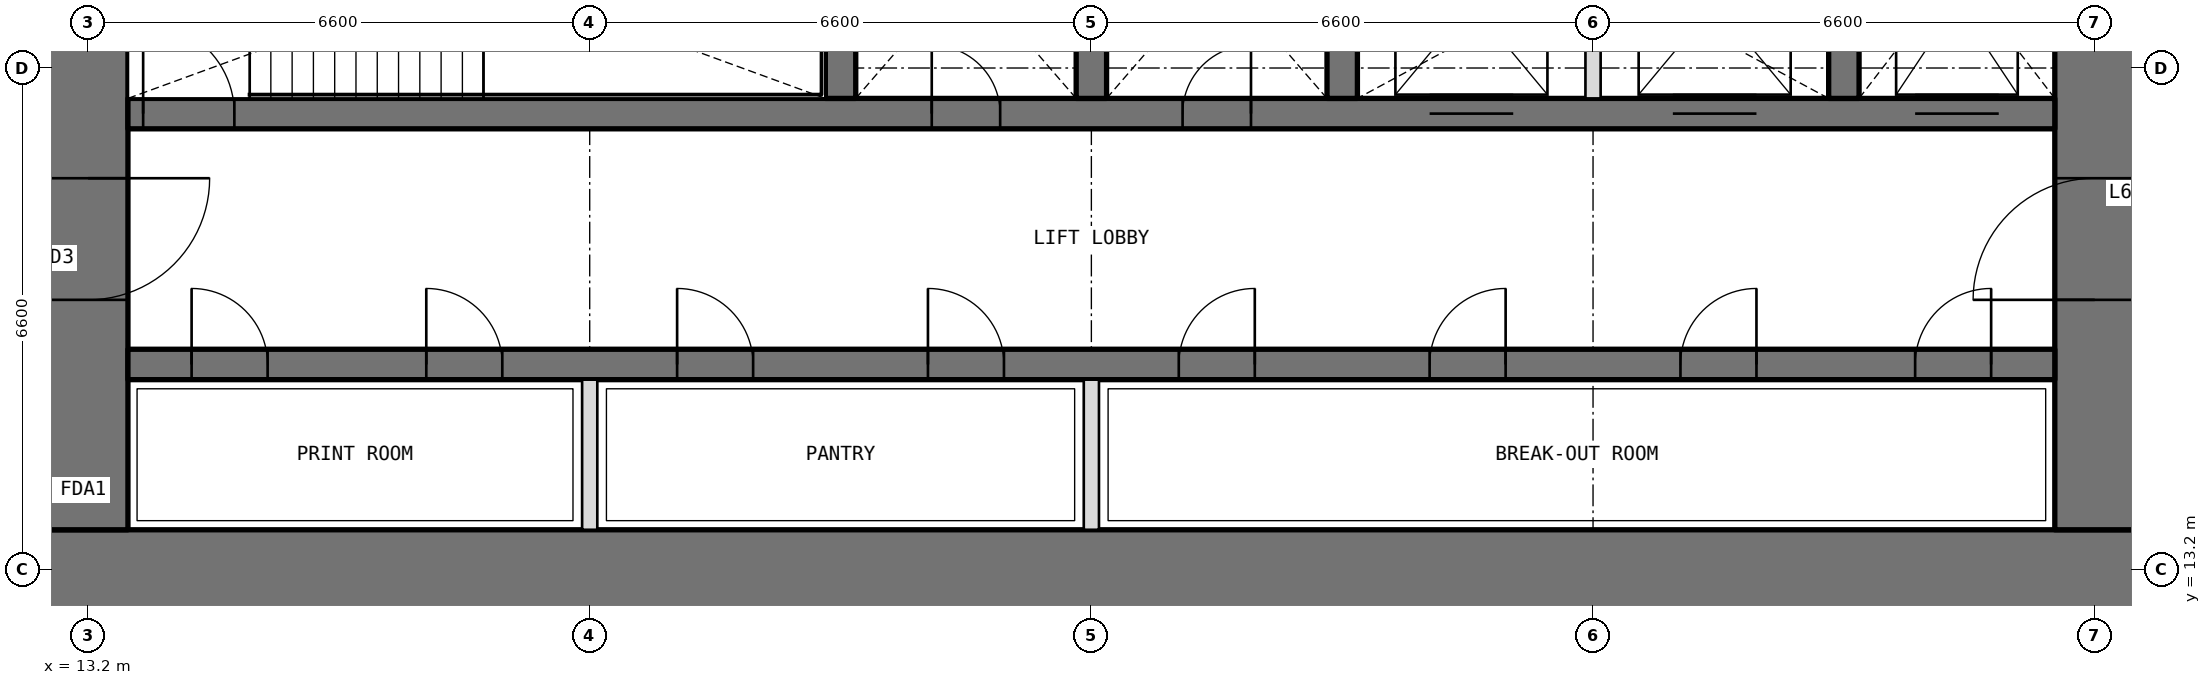
"""IFC4 building model, lengths in metres.
Left out: names, types, materials, properties, quantities, classifications, styles, units other than length and angle.
Written with IfcOpenShell. Run it as: python <this file> out.ifc"""

import sys

from ifc_helpers import new_model, si_unit, direction, frame, frame_2d, origin, place, context, subcontext, project, spatial, rectangle, extrude, element, fill, save


model = new_model("IFC4")
c1 = context("Model", 3, precision=1e-05, world=origin(), true_north=direction((0.0, 1.0)))
c2 = subcontext(c1, "Body", "Model", "MODEL_VIEW")
j1 = project(units=[si_unit("LENGTHUNIT", "METRE"), si_unit("PLANEANGLEUNIT", "RADIAN")], contexts=[c1])
p1 = place(None, origin())
s1 = spatial("IfcSite", under=j1, at=p1, CompositionType="ELEMENT")
p2 = place(p1, origin())
s2 = spatial("IfcBuilding", under=s1, at=p2, CompositionType="ELEMENT")
p3 = place(p2, frame((0.0, 0.0, 275.4)))
s3 = spatial("IfcBuildingStorey", under=s2, at=p3, CompositionType="ELEMENT", Elevation=275.4)
p4 = place(p3, frame((12.675, 13.2, 0.0), z_axis=(0.0, 0.0, 1.0), x_axis=(1.0, 0.0, 0.0)))
e1 = element("IfcWall", 1, at=p4, inside=s3, PredefinedType="SHEAR", context=c2, shape_type="SweptSolid", body=[
    extrude(rectangle(XDim=27.45, YDim=1.05, at=frame_2d((13.725, 0.0))), origin(), (0.0, 0.0, 1.0), 4.2),
])
p5 = place(p3, frame((39.6, 13.725, 0.0), z_axis=(0.0, 0.0, 1.0), x_axis=(0.0, 1.0, 0.0)))
e2 = element("IfcWall", 2, at=p5, inside=s3, PredefinedType="SHEAR", context=c2, shape_type="SweptSolid", body=[
    extrude(rectangle(XDim=18.75, YDim=1.05, at=frame_2d((9.375, 0.0))), origin(), (0.0, 0.0, 1.0), 4.2),
])
p6 = place(p5, frame((3.025, 0.0, 0.0)))
e3 = element("IfcOpeningElement", 3, at=p6, cuts=e2, PredefinedType="OPENING", context=c2, shape_type="SweptSolid", body=[
    extrude(rectangle(XDim=1.6, YDim=2.1, at=frame_2d((0.8, 1.05))), frame((0.0, 0.535, 0.0), z_axis=(0.0, -1.0, 0.0), x_axis=(1.0, 0.0, 0.0)), (0.0, 0.0, 1.0), 1.07),
])
p7 = place(p5, frame((13.825, 0.0, 0.0)))
e4 = element("IfcOpeningElement", 4, at=p7, cuts=e2, PredefinedType="OPENING", context=c2, shape_type="SweptSolid", body=[
    extrude(rectangle(XDim=1.6, YDim=2.1, at=frame_2d((0.8, 1.05))), frame((0.0, 0.535, 0.0), z_axis=(0.0, -1.0, 0.0), x_axis=(1.0, 0.0, 0.0)), (0.0, 0.0, 1.0), 1.07),
])
p8 = place(p3, frame((13.2, 32.475, 0.0), z_axis=(0.0, 0.0, 1.0), x_axis=(0.0, -1.0, 0.0)))
e5 = element("IfcWall", 5, at=p8, inside=s3, PredefinedType="SHEAR", context=c2, shape_type="SweptSolid", body=[
    extrude(rectangle(XDim=18.75, YDim=1.05, at=frame_2d((9.375, 0.0))), origin(), (0.0, 0.0, 1.0), 4.2),
])
p9 = place(p8, frame((14.125, 0.0, 0.0)))
e6 = element("IfcOpeningElement", 6, at=p9, cuts=e5, PredefinedType="OPENING", context=c2, shape_type="SweptSolid", body=[
    extrude(rectangle(XDim=1.6, YDim=2.1, at=frame_2d((0.8, 1.05))), frame((0.0, 0.535, 0.0), z_axis=(0.0, -1.0, 0.0), x_axis=(1.0, 0.0, 0.0)), (0.0, 0.0, 1.0), 1.07),
])
p10 = place(p8, frame((3.325, 0.0, 0.0)))
e7 = element("IfcOpeningElement", 7, at=p10, cuts=e5, PredefinedType="OPENING", context=c2, shape_type="SweptSolid", body=[
    extrude(rectangle(XDim=1.6, YDim=2.1, at=frame_2d((0.8, 1.05))), frame((0.0, 0.535, 0.0), z_axis=(0.0, -1.0, 0.0), x_axis=(1.0, 0.0, 0.0)), (0.0, 0.0, 1.0), 1.07),
])
p11 = place(p3, frame((13.725, 15.9, 0.0), z_axis=(0.0, 0.0, 1.0), x_axis=(1.0, 0.0, 0.0)))
e8 = element("IfcWall", 8, at=p11, inside=s3, PredefinedType="SHEAR", context=c2, shape_type="SweptSolid", body=[
    extrude(rectangle(XDim=25.35, YDim=0.4, at=frame_2d((12.675, 0.0))), origin(), (0.0, 0.0, 1.0), 4.2),
])
p12 = place(p11, frame((0.837, 0.0, 0.0)))
e9 = element("IfcOpeningElement", 9, at=p12, cuts=e8, PredefinedType="OPENING", context=c2, shape_type="SweptSolid", body=[
    extrude(rectangle(XDim=1.0, YDim=2.1, at=frame_2d((0.5, 1.05))), frame((0.0, 0.21, 0.0), z_axis=(0.0, -1.0, 0.0), x_axis=(1.0, 0.0, 0.0)), (0.0, 0.0, 1.0), 0.42),
])
p13 = place(p11, frame((3.925, 0.0, 0.0)))
e10 = element("IfcOpeningElement", 10, at=p13, cuts=e8, PredefinedType="OPENING", context=c2, shape_type="SweptSolid", body=[
    extrude(rectangle(XDim=1.0, YDim=2.1, at=frame_2d((0.5, 1.05))), frame((0.0, 0.21, 0.0), z_axis=(0.0, -1.0, 0.0), x_axis=(1.0, 0.0, 0.0)), (0.0, 0.0, 1.0), 0.42),
])
p14 = place(p11, frame((7.225, 0.0, 0.0)))
e11 = element("IfcOpeningElement", 11, at=p14, cuts=e8, PredefinedType="OPENING", context=c2, shape_type="SweptSolid", body=[
    extrude(rectangle(XDim=1.0, YDim=2.1, at=frame_2d((0.5, 1.05))), frame((0.0, 0.21, 0.0), z_axis=(0.0, -1.0, 0.0), x_axis=(1.0, 0.0, 0.0)), (0.0, 0.0, 1.0), 0.42),
])
p15 = place(p11, frame((10.525, 0.0, 0.0)))
e12 = element("IfcOpeningElement", 12, at=p15, cuts=e8, PredefinedType="OPENING", context=c2, shape_type="SweptSolid", body=[
    extrude(rectangle(XDim=1.0, YDim=2.1, at=frame_2d((0.5, 1.05))), frame((0.0, 0.21, 0.0), z_axis=(0.0, -1.0, 0.0), x_axis=(1.0, 0.0, 0.0)), (0.0, 0.0, 1.0), 0.42),
])
p16 = place(p11, frame((13.825, 0.0, 0.0)))
e13 = element("IfcOpeningElement", 13, at=p16, cuts=e8, PredefinedType="OPENING", context=c2, shape_type="SweptSolid", body=[
    extrude(rectangle(XDim=1.0, YDim=2.1, at=frame_2d((0.5, 1.05))), frame((0.0, 0.21, 0.0), z_axis=(0.0, -1.0, 0.0), x_axis=(1.0, 0.0, 0.0)), (0.0, 0.0, 1.0), 0.42),
])
p17 = place(p11, frame((17.125, 0.0, 0.0)))
e14 = element("IfcOpeningElement", 14, at=p17, cuts=e8, PredefinedType="OPENING", context=c2, shape_type="SweptSolid", body=[
    extrude(rectangle(XDim=1.0, YDim=2.1, at=frame_2d((0.5, 1.05))), frame((0.0, 0.21, 0.0), z_axis=(0.0, -1.0, 0.0), x_axis=(1.0, 0.0, 0.0)), (0.0, 0.0, 1.0), 0.42),
])
p18 = place(p11, frame((20.425, 0.0, 0.0)))
e15 = element("IfcOpeningElement", 15, at=p18, cuts=e8, PredefinedType="OPENING", context=c2, shape_type="SweptSolid", body=[
    extrude(rectangle(XDim=1.0, YDim=2.1, at=frame_2d((0.5, 1.05))), frame((0.0, 0.21, 0.0), z_axis=(0.0, -1.0, 0.0), x_axis=(1.0, 0.0, 0.0)), (0.0, 0.0, 1.0), 0.42),
])
p19 = place(p11, frame((23.512, 0.0, 0.0)))
e16 = element("IfcOpeningElement", 16, at=p19, cuts=e8, PredefinedType="OPENING", context=c2, shape_type="SweptSolid", body=[
    extrude(rectangle(XDim=1.0, YDim=2.1, at=frame_2d((0.5, 1.05))), frame((0.0, 0.21, 0.0), z_axis=(0.0, -1.0, 0.0), x_axis=(1.0, 0.0, 0.0)), (0.0, 0.0, 1.0), 0.42),
])
p20 = place(p3, frame((13.725, 19.2, 0.0), z_axis=(0.0, 0.0, 1.0), x_axis=(1.0, 0.0, 0.0)))
e17 = element("IfcWall", 17, at=p20, inside=s3, PredefinedType="SHEAR", context=c2, shape_type="SweptSolid", body=[
    extrude(rectangle(XDim=25.35, YDim=0.4, at=frame_2d((12.675, 0.0))), origin(), (0.0, 0.0, 1.0), 4.2),
])
p21 = place(p20, frame((10.575, 0.0, 0.0)))
e18 = element("IfcOpeningElement", 18, at=p21, cuts=e17, PredefinedType="OPENING", context=c2, shape_type="SweptSolid", body=[
    extrude(rectangle(XDim=0.9, YDim=2.1, at=frame_2d((0.45, 1.05))), frame((0.0, 0.21, 0.0), z_axis=(0.0, -1.0, 0.0), x_axis=(1.0, 0.0, 0.0)), (0.0, 0.0, 1.0), 0.42),
])
p22 = place(p20, frame((13.875, 0.0, 0.0)))
e19 = element("IfcOpeningElement", 19, at=p22, cuts=e17, PredefinedType="OPENING", context=c2, shape_type="SweptSolid", body=[
    extrude(rectangle(XDim=0.9, YDim=2.1, at=frame_2d((0.45, 1.05))), frame((0.0, 0.21, 0.0), z_axis=(0.0, -1.0, 0.0), x_axis=(1.0, 0.0, 0.0)), (0.0, 0.0, 1.0), 0.42),
])
p23 = place(p20, frame((0.2, 0.0, 0.0)))
e20 = element("IfcOpeningElement", 20, at=p23, cuts=e17, PredefinedType="OPENING", context=c2, shape_type="SweptSolid", body=[
    extrude(rectangle(XDim=1.2, YDim=2.1, at=frame_2d((0.6, 1.05))), frame((0.0, 0.21, 0.0), z_axis=(0.0, -1.0, 0.0), x_axis=(1.0, 0.0, 0.0)), (0.0, 0.0, 1.0), 0.42),
])
p24 = place(p20, frame((23.512, 0.0, 0.0)))
e21 = element("IfcOpeningElement", 21, at=p24, cuts=e17, PredefinedType="OPENING", context=c2, shape_type="SweptSolid", body=[
    extrude(rectangle(XDim=1.1, YDim=2.1, at=frame_2d((0.55, 1.05))), frame((0.0, 0.21, 0.0), z_axis=(0.0, -1.0, 0.0), x_axis=(1.0, 0.0, 0.0)), (0.0, 0.0, 1.0), 0.42),
])
p25 = place(p20, frame((17.125, 0.0, 0.0)))
e22 = element("IfcOpeningElement", 22, at=p25, cuts=e17, PredefinedType="OPENING", context=c2, shape_type="SweptSolid", body=[
    extrude(rectangle(XDim=1.1, YDim=2.1, at=frame_2d((0.55, 1.05))), frame((0.0, 0.21, 0.0), z_axis=(0.0, -1.0, 0.0), x_axis=(1.0, 0.0, 0.0)), (0.0, 0.0, 1.0), 0.42),
])
p26 = place(p20, frame((20.325, 0.0, 0.0)))
e23 = element("IfcOpeningElement", 23, at=p26, cuts=e17, PredefinedType="OPENING", context=c2, shape_type="SweptSolid", body=[
    extrude(rectangle(XDim=1.1, YDim=2.1, at=frame_2d((0.55, 1.05))), frame((0.0, 0.21, 0.0), z_axis=(0.0, -1.0, 0.0), x_axis=(1.0, 0.0, 0.0)), (0.0, 0.0, 1.0), 0.42),
])
for number, where, z_axis, x_axis in (
    (24, (23.1, 19.4, 0.0), (0.0, 0.0, 1.0), (0.0, 1.0, 0.0)),
    (25, (26.4, 19.4, 0.0), (0.0, 0.0, 1.0), (0.0, 1.0, 0.0)),
    (26, (29.7, 19.4, 0.0), (0.0, 0.0, 1.0), (0.0, 1.0, 0.0)),
    (27, (36.3, 19.4, 0.0), (0.0, 0.0, 1.0), (0.0, 1.0, 0.0)),
):
    element("IfcWall", number, at=place(p3, frame(where, z_axis=z_axis, x_axis=x_axis)), inside=s3, PredefinedType="SHEAR", context=c2, shape_type="SweptSolid", body=[
        extrude(rectangle(XDim=3.35, YDim=0.4, at=frame_2d((1.675, 0.0))), origin(), (0.0, 0.0, 1.0), 4.2),
    ])
for number, where, z_axis, x_axis in (
    (28, (19.8, 13.725, 0.0), (0.0, 0.0, 1.0), (0.0, 1.0, 0.0)),
    (29, (26.4, 13.725, 0.0), (0.0, 0.0, 1.0), (0.0, 1.0, 0.0)),
):
    element("IfcWall", number, at=place(p3, frame(where, z_axis=z_axis, x_axis=x_axis)), inside=s3, PredefinedType="PARTITIONING", context=c2, shape_type="SweptSolid", body=[
        extrude(rectangle(XDim=1.975, YDim=0.2, at=frame_2d((0.987, 0.0))), origin(), (0.0, 0.0, 1.0), 4.2),
    ])
p27 = place(p3, frame((33.0, 19.4, 0.0), z_axis=(0.0, 0.0, 1.0), x_axis=(0.0, 1.0, 0.0)))
e30 = element("IfcWall", 30, at=p27, inside=s3, PredefinedType="PARTITIONING", context=c2, shape_type="SweptSolid", body=[
    extrude(rectangle(XDim=3.35, YDim=0.2, at=frame_2d((1.675, 0.0))), origin(), (0.0, 0.0, 1.0), 4.2),
])
p28 = place(p21, origin())
e31 = element("IfcDoor", 31, at=p28, inside=s3, OperationType="SINGLE_SWING_LEFT", PredefinedType="DOOR", context=c2, shape_type="SweptSolid", body=[
    extrude(rectangle(XDim=0.9, YDim=2.1, at=frame_2d((0.45, 1.05))), frame((0.0, 0.025, 0.0), z_axis=(0.0, -1.0, 0.0), x_axis=(1.0, 0.0, 0.0)), (0.0, 0.0, 1.0), 0.05),
])
fill(e18, e31)
p29 = place(p22, origin())
e32 = element("IfcDoor", 32, at=p29, inside=s3, OperationType="SINGLE_SWING_RIGHT", PredefinedType="DOOR", context=c2, shape_type="SweptSolid", body=[
    extrude(rectangle(XDim=0.9, YDim=2.1, at=frame_2d((0.45, 1.05))), frame((0.0, 0.025, 0.0), z_axis=(0.0, -1.0, 0.0), x_axis=(1.0, 0.0, 0.0)), (0.0, 0.0, 1.0), 0.05),
])
fill(e19, e32)
p30 = place(p12, origin())
e33 = element("IfcDoor", 33, at=p30, inside=s3, OperationType="SINGLE_SWING_LEFT", PredefinedType="DOOR", context=c2, shape_type="SweptSolid", body=[
    extrude(rectangle(XDim=1.0, YDim=2.1, at=frame_2d((0.5, 1.05))), frame((0.0, 0.025, 0.0), z_axis=(0.0, -1.0, 0.0), x_axis=(1.0, 0.0, 0.0)), (0.0, 0.0, 1.0), 0.05),
])
fill(e9, e33)
p31 = place(p13, origin())
e34 = element("IfcDoor", 34, at=p31, inside=s3, OperationType="SINGLE_SWING_LEFT", PredefinedType="DOOR", context=c2, shape_type="SweptSolid", body=[
    extrude(rectangle(XDim=1.0, YDim=2.1, at=frame_2d((0.5, 1.05))), frame((0.0, 0.025, 0.0), z_axis=(0.0, -1.0, 0.0), x_axis=(1.0, 0.0, 0.0)), (0.0, 0.0, 1.0), 0.05),
])
fill(e10, e34)
p32 = place(p14, origin())
e35 = element("IfcDoor", 35, at=p32, inside=s3, OperationType="SINGLE_SWING_LEFT", PredefinedType="DOOR", context=c2, shape_type="SweptSolid", body=[
    extrude(rectangle(XDim=1.0, YDim=2.1, at=frame_2d((0.5, 1.05))), frame((0.0, 0.025, 0.0), z_axis=(0.0, -1.0, 0.0), x_axis=(1.0, 0.0, 0.0)), (0.0, 0.0, 1.0), 0.05),
])
fill(e11, e35)
p33 = place(p15, origin())
e36 = element("IfcDoor", 36, at=p33, inside=s3, OperationType="SINGLE_SWING_LEFT", PredefinedType="DOOR", context=c2, shape_type="SweptSolid", body=[
    extrude(rectangle(XDim=1.0, YDim=2.1, at=frame_2d((0.5, 1.05))), frame((0.0, 0.025, 0.0), z_axis=(0.0, -1.0, 0.0), x_axis=(1.0, 0.0, 0.0)), (0.0, 0.0, 1.0), 0.05),
])
fill(e12, e36)
p34 = place(p16, origin())
e37 = element("IfcDoor", 37, at=p34, inside=s3, OperationType="SINGLE_SWING_RIGHT", PredefinedType="DOOR", context=c2, shape_type="SweptSolid", body=[
    extrude(rectangle(XDim=1.0, YDim=2.1, at=frame_2d((0.5, 1.05))), frame((0.0, 0.025, 0.0), z_axis=(0.0, -1.0, 0.0), x_axis=(1.0, 0.0, 0.0)), (0.0, 0.0, 1.0), 0.05),
])
fill(e13, e37)
p35 = place(p17, origin())
e38 = element("IfcDoor", 38, at=p35, inside=s3, OperationType="SINGLE_SWING_RIGHT", PredefinedType="DOOR", context=c2, shape_type="SweptSolid", body=[
    extrude(rectangle(XDim=1.0, YDim=2.1, at=frame_2d((0.5, 1.05))), frame((0.0, 0.025, 0.0), z_axis=(0.0, -1.0, 0.0), x_axis=(1.0, 0.0, 0.0)), (0.0, 0.0, 1.0), 0.05),
])
fill(e14, e38)
p36 = place(p18, origin())
e39 = element("IfcDoor", 39, at=p36, inside=s3, OperationType="SINGLE_SWING_RIGHT", PredefinedType="DOOR", context=c2, shape_type="SweptSolid", body=[
    extrude(rectangle(XDim=1.0, YDim=2.1, at=frame_2d((0.5, 1.05))), frame((0.0, 0.025, 0.0), z_axis=(0.0, -1.0, 0.0), x_axis=(1.0, 0.0, 0.0)), (0.0, 0.0, 1.0), 0.05),
])
fill(e15, e39)
p37 = place(p19, origin())
e40 = element("IfcDoor", 40, at=p37, inside=s3, OperationType="SINGLE_SWING_RIGHT", PredefinedType="DOOR", context=c2, shape_type="SweptSolid", body=[
    extrude(rectangle(XDim=1.0, YDim=2.1, at=frame_2d((0.5, 1.05))), frame((0.0, 0.025, 0.0), z_axis=(0.0, -1.0, 0.0), x_axis=(1.0, 0.0, 0.0)), (0.0, 0.0, 1.0), 0.05),
])
fill(e16, e40)
p38 = place(p23, origin())
e41 = element("IfcDoor", 41, at=p38, inside=s3, OperationType="SINGLE_SWING_LEFT", PredefinedType="DOOR", context=c2, shape_type="SweptSolid", body=[
    extrude(rectangle(XDim=1.2, YDim=2.1, at=frame_2d((0.6, 1.05))), frame((0.0, 0.025, 0.0), z_axis=(0.0, -1.0, 0.0), x_axis=(1.0, 0.0, 0.0)), (0.0, 0.0, 1.0), 0.05),
])
fill(e20, e41)
p39 = place(p9, origin())
e42 = element("IfcDoor", 42, at=p39, inside=s3, OperationType="DOUBLE_DOOR_DOUBLE_SWING", PredefinedType="DOOR", context=c2, shape_type="SweptSolid", body=[
    extrude(rectangle(XDim=1.6, YDim=2.1, at=frame_2d((0.8, 1.05))), frame((0.0, 0.025, 0.0), z_axis=(0.0, -1.0, 0.0), x_axis=(1.0, 0.0, 0.0)), (0.0, 0.0, 1.0), 0.05),
])
fill(e6, e42)
p40 = place(p6, origin())
e43 = element("IfcDoor", 43, at=p40, inside=s3, OperationType="DOUBLE_DOOR_DOUBLE_SWING", PredefinedType="DOOR", context=c2, shape_type="SweptSolid", body=[
    extrude(rectangle(XDim=1.6, YDim=2.1, at=frame_2d((0.8, 1.05))), frame((0.0, 0.025, 0.0), z_axis=(0.0, -1.0, 0.0), x_axis=(1.0, 0.0, 0.0)), (0.0, 0.0, 1.0), 0.05),
])
fill(e3, e43)
p41 = place(p24, origin())
e44 = element("IfcDoor", 44, at=p41, inside=s3, OperationType="DOUBLE_DOOR_SLIDING", PredefinedType="DOOR", context=c2, shape_type="SweptSolid", body=[
    extrude(rectangle(XDim=1.1, YDim=2.1, at=frame_2d((0.55, 1.05))), frame((0.0, 0.025, 0.0), z_axis=(0.0, -1.0, 0.0), x_axis=(1.0, 0.0, 0.0)), (0.0, 0.0, 1.0), 0.05),
])
fill(e21, e44)
p42 = place(p25, origin())
e45 = element("IfcDoor", 45, at=p42, inside=s3, OperationType="DOUBLE_DOOR_SLIDING", PredefinedType="DOOR", context=c2, shape_type="SweptSolid", body=[
    extrude(rectangle(XDim=1.1, YDim=2.1, at=frame_2d((0.55, 1.05))), frame((0.0, 0.025, 0.0), z_axis=(0.0, -1.0, 0.0), x_axis=(1.0, 0.0, 0.0)), (0.0, 0.0, 1.0), 0.05),
])
fill(e22, e45)
p43 = place(p26, origin())
e46 = element("IfcDoor", 46, at=p43, inside=s3, OperationType="DOUBLE_DOOR_SLIDING", PredefinedType="DOOR", context=c2, shape_type="SweptSolid", body=[
    extrude(rectangle(XDim=1.1, YDim=2.1, at=frame_2d((0.55, 1.05))), frame((0.0, 0.025, 0.0), z_axis=(0.0, -1.0, 0.0), x_axis=(1.0, 0.0, 0.0)), (0.0, 0.0, 1.0), 0.05),
])
fill(e23, e46)
save(model, sys.argv[1])
